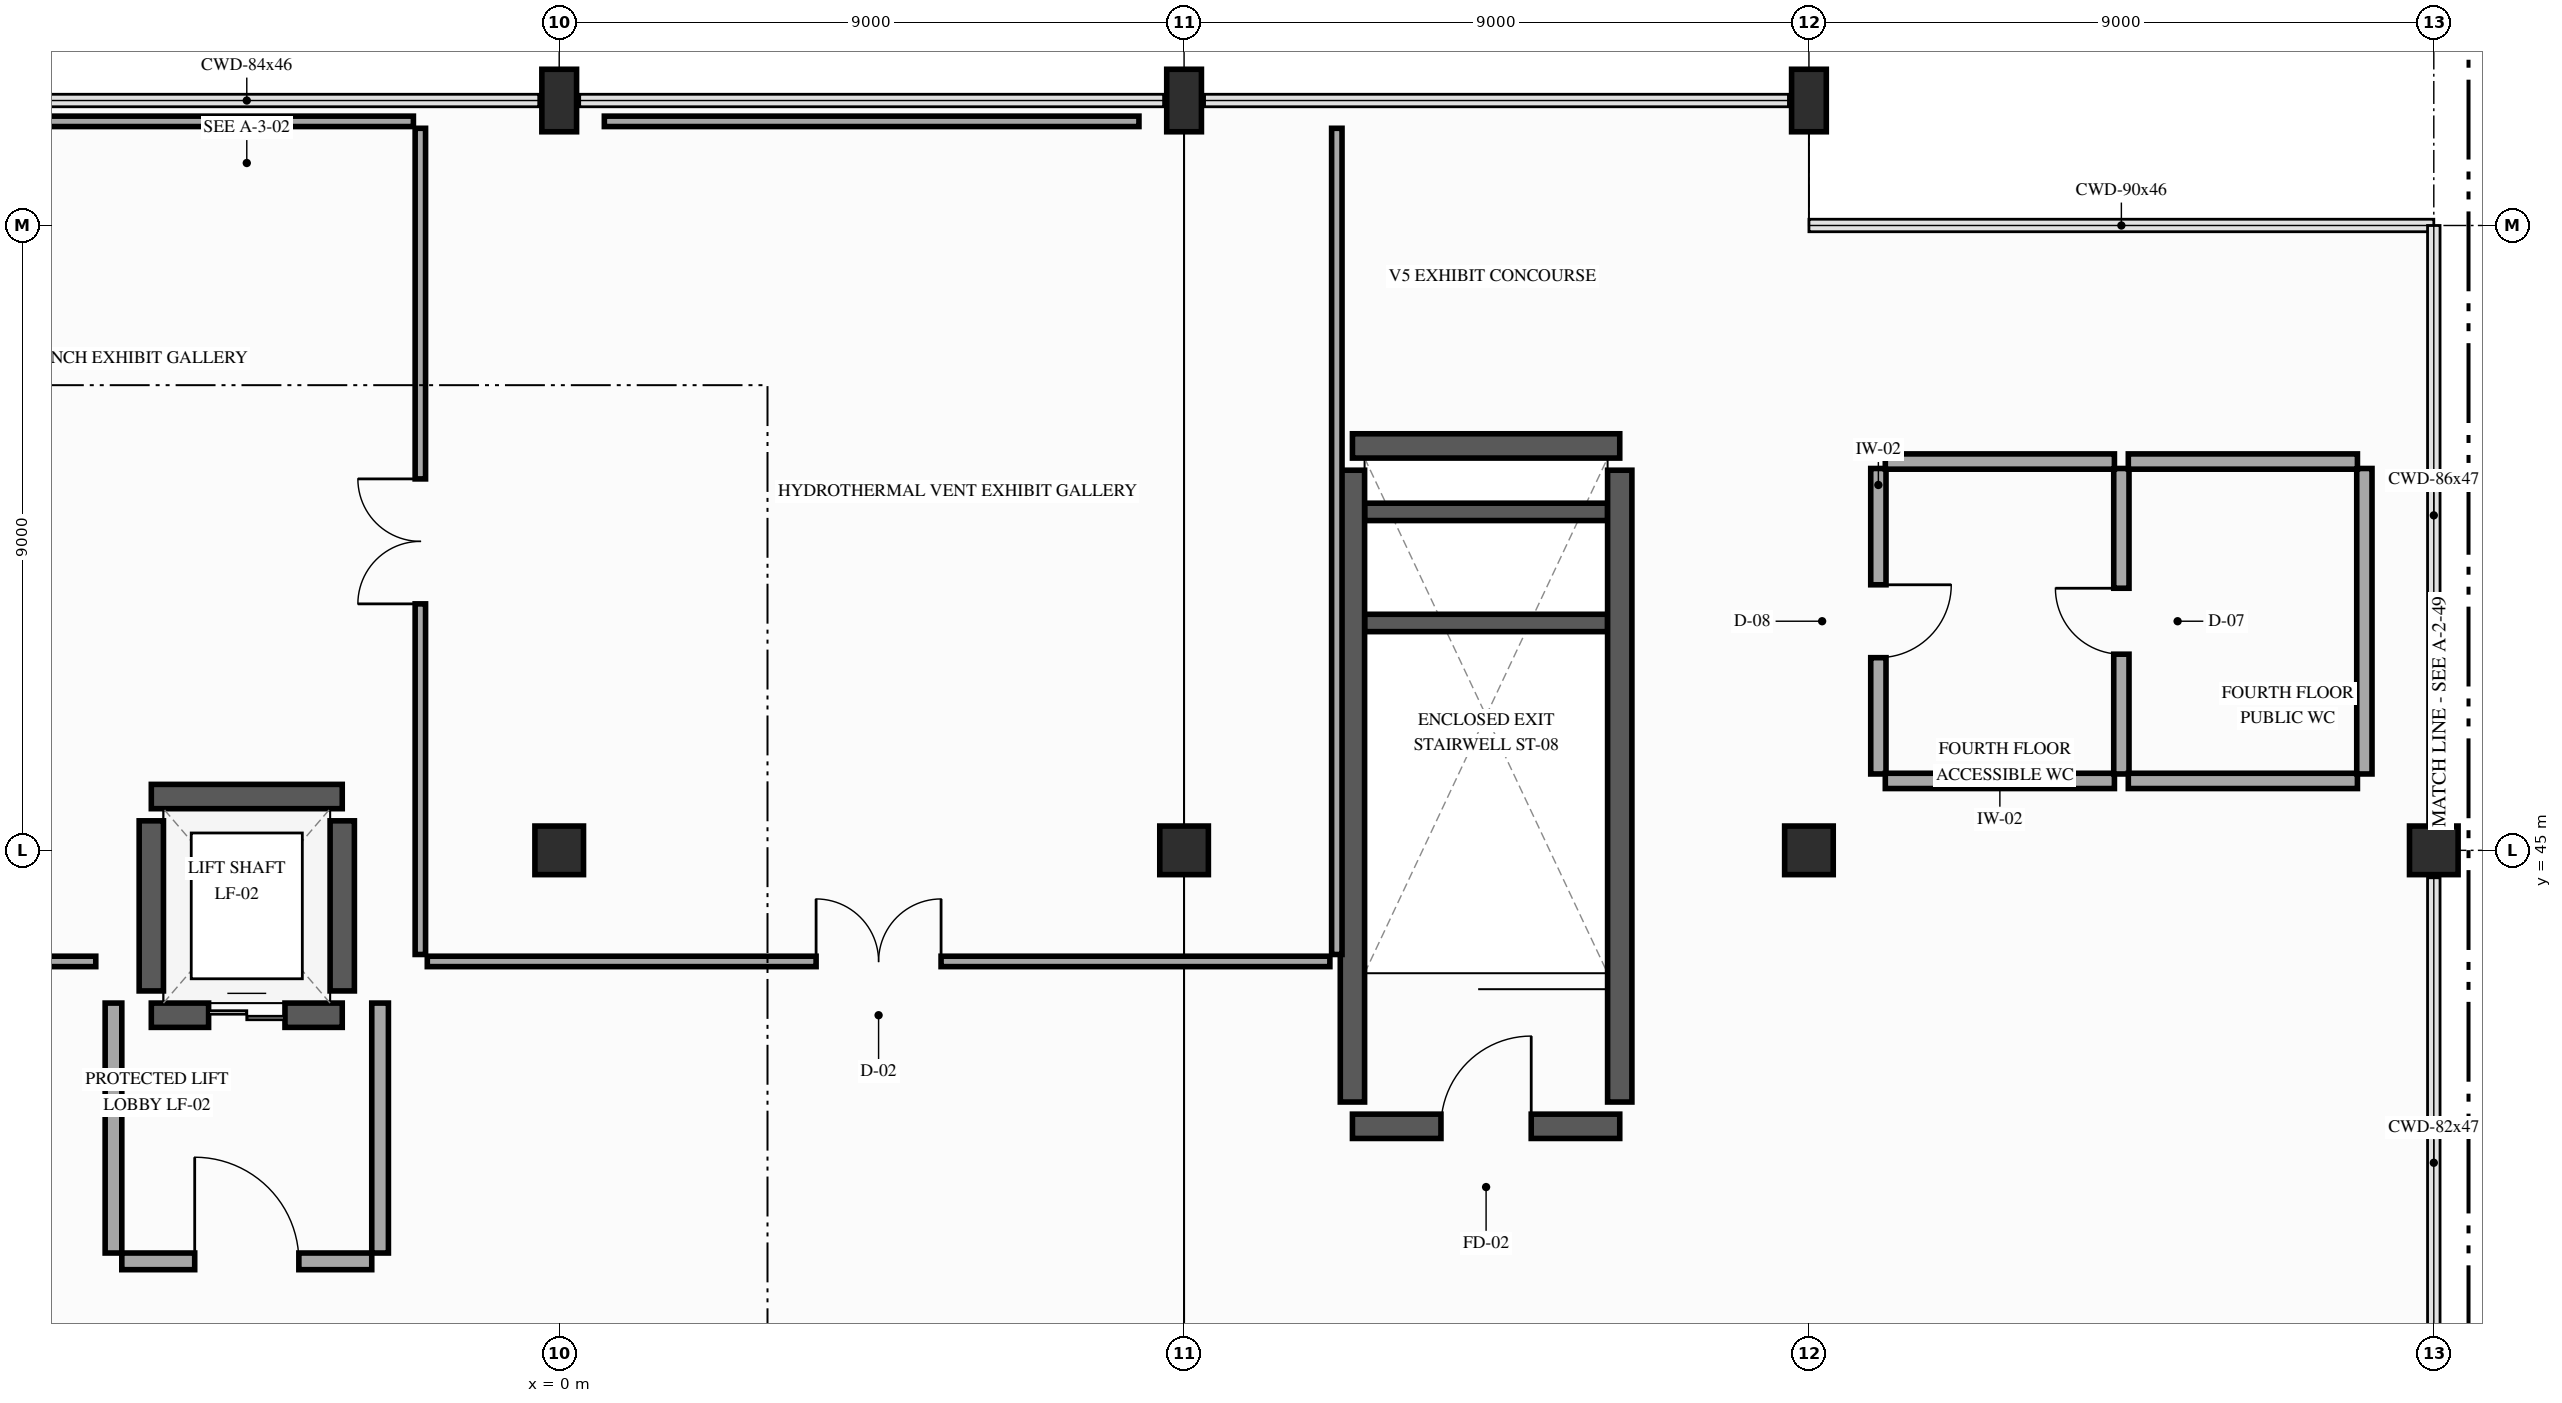
"""IFC4 building model, lengths in metres.
Left out: names, types, materials, properties, quantities, classifications, styles, units other than length and angle.
Written with IfcOpenShell. Run it as: python <this file> out.ifc"""

import sys

from ifc_helpers import new_model, si_unit, direction, frame, frame_2d, origin, origin_2d, place, context, subcontext, project, spatial, rectangle, extrude, element, fill, save


model = new_model("IFC4")
c1 = context("Model", 3, precision=1e-05, world=origin(), true_north=direction((0.0, 1.0)))
c2 = subcontext(c1, "Body", "Model", "MODEL_VIEW")
j1 = project(units=[si_unit("LENGTHUNIT", "METRE"), si_unit("PLANEANGLEUNIT", "RADIAN")], contexts=[c1])
p1 = place(None, origin())
s1 = spatial("IfcSite", under=j1, at=p1, CompositionType="ELEMENT")
p2 = place(p1, origin())
s2 = spatial("IfcBuilding", under=s1, at=p2, CompositionType="ELEMENT")
p3 = place(p2, frame((0.0, 0.0, 21.6)))
s3 = spatial("IfcBuildingStorey", under=s2, at=p3, CompositionType="ELEMENT", Elevation=21.6)
p4 = place(p3, frame((0.0, 45.0, 0.0), z_axis=(0.0, 0.0, 1.0), x_axis=(1.0, 0.0, 0.0)))
e1 = element("IfcColumn", 1, at=p4, inside=s3, PredefinedType="COLUMN", context=c2, shape_type="SweptSolid", body=[
    extrude(rectangle(XDim=0.7, YDim=0.7, at=origin_2d()), origin(), (0.0, 0.0, 1.0), 5.4),
])
p5 = place(p3, frame((0.0, 55.8, 0.0), z_axis=(0.0, 0.0, 1.0), x_axis=(1.0, 0.0, 0.0)))
e2 = element("IfcColumn", 2, at=p5, inside=s3, PredefinedType="PILASTER", context=c2, shape_type="SweptSolid", body=[
    extrude(rectangle(XDim=0.5, YDim=0.9, at=origin_2d()), origin(), (0.0, 0.0, 1.0), 5.4),
])
p6 = place(p3, frame((9.0, 45.0, 0.0), z_axis=(0.0, 0.0, 1.0), x_axis=(1.0, 0.0, 0.0)))
e3 = element("IfcColumn", 3, at=p6, inside=s3, PredefinedType="COLUMN", context=c2, shape_type="SweptSolid", body=[
    extrude(rectangle(XDim=0.7, YDim=0.7, at=origin_2d()), origin(), (0.0, 0.0, 1.0), 5.4),
])
p7 = place(p3, frame((9.0, 55.8, 0.0), z_axis=(0.0, 0.0, 1.0), x_axis=(1.0, 0.0, 0.0)))
e4 = element("IfcColumn", 4, at=p7, inside=s3, PredefinedType="PILASTER", context=c2, shape_type="SweptSolid", body=[
    extrude(rectangle(XDim=0.5, YDim=0.9, at=origin_2d()), origin(), (0.0, 0.0, 1.0), 5.4),
])
p8 = place(p3, frame((18.0, 45.0, 0.0), z_axis=(0.0, 0.0, 1.0), x_axis=(1.0, 0.0, 0.0)))
e5 = element("IfcColumn", 5, at=p8, inside=s3, PredefinedType="COLUMN", context=c2, shape_type="SweptSolid", body=[
    extrude(rectangle(XDim=0.7, YDim=0.7, at=origin_2d()), origin(), (0.0, 0.0, 1.0), 5.4),
])
p9 = place(p3, frame((18.0, 55.8, 0.0), z_axis=(0.0, 0.0, 1.0), x_axis=(1.0, 0.0, 0.0)))
e6 = element("IfcColumn", 6, at=p9, inside=s3, PredefinedType="PILASTER", context=c2, shape_type="SweptSolid", body=[
    extrude(rectangle(XDim=0.5, YDim=0.9, at=origin_2d()), origin(), (0.0, 0.0, 1.0), 5.4),
])
p10 = place(p3, frame((27.0, 45.0, 0.0), z_axis=(0.0, 0.0, 1.0), x_axis=(1.0, 0.0, 0.0)))
e7 = element("IfcColumn", 7, at=p10, inside=s3, PredefinedType="COLUMN", context=c2, shape_type="SweptSolid", body=[
    extrude(rectangle(XDim=0.7, YDim=0.7, at=origin_2d()), origin(), (0.0, 0.0, 1.0), 5.4),
])
for number, where, z_axis, x_axis in (
    (8, (11.6, 48.275, 0.0), (0.0, 0.0, 1.0), (1.0, 0.0, 0.0)),
    (9, (11.6, 49.875, 0.0), (0.0, 0.0, 1.0), (1.0, 0.0, 0.0)),
):
    element("IfcWall", number, at=place(p3, frame(where, z_axis=z_axis, x_axis=x_axis)), inside=s3, PredefinedType="SHEAR", context=c2, shape_type="SweptSolid", body=[
        extrude(rectangle(XDim=3.5, YDim=0.25, at=frame_2d((1.75, 0.0))), origin(), (0.0, 0.0, 1.0), 2.5),
    ])
p11 = place(p3, frame((11.425, 41.025, 0.0), z_axis=(0.0, 0.0, 1.0), x_axis=(1.0, 0.0, 0.0)))
e10 = element("IfcWall", 10, at=p11, inside=s3, PredefinedType="SHEAR", context=c2, shape_type="SweptSolid", body=[
    extrude(rectangle(XDim=3.85, YDim=0.35, at=frame_2d((1.925, 0.0))), origin(), (0.0, 0.0, 1.0), 5.15),
])
p12 = place(p11, frame((1.275, 0.0, 0.0)))
e11 = element("IfcOpeningElement", 11, at=p12, cuts=e10, PredefinedType="OPENING", context=c2, shape_type="SweptSolid", body=[
    extrude(rectangle(XDim=1.3, YDim=2.2, at=frame_2d((0.65, 1.1))), frame((0.0, 0.185, 0.0), z_axis=(0.0, -1.0, 0.0), x_axis=(1.0, 0.0, 0.0)), (0.0, 0.0, 1.0), 0.37),
])
p13 = place(p3, frame((11.425, 50.825, 0.0), z_axis=(0.0, 0.0, 1.0), x_axis=(1.0, 0.0, 0.0)))
e12 = element("IfcWall", 12, at=p13, inside=s3, PredefinedType="SHEAR", context=c2, shape_type="SweptSolid", body=[
    extrude(rectangle(XDim=3.85, YDim=0.35, at=frame_2d((1.925, 0.0))), origin(), (0.0, 0.0, 1.0), 5.15),
])
for number, where, z_axis, x_axis in (
    (13, (11.425, 41.375, 0.0), (0.0, 0.0, 1.0), (0.0, 1.0, 0.0)),
    (14, (15.275, 41.375, 0.0), (0.0, 0.0, 1.0), (0.0, 1.0, 0.0)),
):
    element("IfcWall", number, at=place(p3, frame(where, z_axis=z_axis, x_axis=x_axis)), inside=s3, PredefinedType="SHEAR", context=c2, shape_type="SweptSolid", body=[
        extrude(rectangle(XDim=9.1, YDim=0.35, at=frame_2d((4.55, 0.0))), origin(), (0.0, 0.0, 1.0), 5.15),
    ])
p14 = place(p3, frame((-5.875, 42.625, 0.0), z_axis=(0.0, 0.0, 1.0), x_axis=(1.0, 0.0, 0.0)))
e15 = element("IfcWall", 15, at=p14, inside=s3, PredefinedType="SHEAR", context=c2, shape_type="SweptSolid", body=[
    extrude(rectangle(XDim=2.75, YDim=0.35, at=frame_2d((1.375, 0.0))), origin(), (0.0, 0.0, 1.0), 5.15),
])
p15 = place(p14, frame((0.825, 0.0, 0.0)))
e16 = element("IfcOpeningElement", 16, at=p15, cuts=e15, PredefinedType="OPENING", context=c2, shape_type="SweptSolid", body=[
    extrude(rectangle(XDim=1.1, YDim=2.2, at=frame_2d((0.55, 1.1))), frame((0.0, 0.185, 0.0), z_axis=(0.0, -1.0, 0.0), x_axis=(1.0, 0.0, 0.0)), (0.0, 0.0, 1.0), 0.37),
])
p16 = place(p3, frame((-3.125, 45.775, 0.0), z_axis=(0.0, 0.0, 1.0), x_axis=(-1.0, 0.0, 0.0)))
e17 = element("IfcWall", 17, at=p16, inside=s3, PredefinedType="SHEAR", context=c2, shape_type="SweptSolid", body=[
    extrude(rectangle(XDim=2.75, YDim=0.35, at=frame_2d((1.375, 0.0))), origin(), (0.0, 0.0, 1.0), 5.15),
])
for number, where, z_axis, x_axis in (
    (18, (-5.875, 42.975, 0.0), (0.0, 0.0, 1.0), (0.0, 1.0, 0.0)),
    (19, (-3.125, 42.975, 0.0), (0.0, 0.0, 1.0), (0.0, 1.0, 0.0)),
):
    element("IfcWall", number, at=place(p3, frame(where, z_axis=z_axis, x_axis=x_axis)), inside=s3, PredefinedType="SHEAR", context=c2, shape_type="SweptSolid", body=[
        extrude(rectangle(XDim=2.45, YDim=0.35, at=frame_2d((1.225, 0.0))), origin(), (0.0, 0.0, 1.0), 5.15),
    ])
p17 = place(p3, frame((-6.3, 39.08, 0.0), z_axis=(0.0, 0.0, 1.0), x_axis=(1.0, 0.0, 0.0)))
e20 = element("IfcWall", 20, at=p17, inside=s3, PredefinedType="PARTITIONING", context=c2, shape_type="SweptSolid", body=[
    extrude(rectangle(XDim=3.6, YDim=0.24, at=frame_2d((1.8, 0.0))), origin(), (0.0, 0.0, 1.0), 5.1),
])
p18 = place(p17, frame((1.05, 0.0, 0.0)))
e21 = element("IfcOpeningElement", 21, at=p18, cuts=e20, PredefinedType="OPENING", context=c2, shape_type="SweptSolid", body=[
    extrude(rectangle(XDim=1.5, YDim=2.2, at=frame_2d((0.75, 1.1))), frame((0.0, 0.13, 0.0), z_axis=(0.0, -1.0, 0.0), x_axis=(1.0, 0.0, 0.0)), (0.0, 0.0, 1.0), 0.26),
])
for number, where, z_axis, x_axis in (
    (22, (-6.42, 39.2, 0.0), (0.0, 0.0, 1.0), (0.0, 1.0, 0.0)),
    (23, (-2.58, 39.2, 0.0), (0.0, 0.0, 1.0), (0.0, 1.0, 0.0)),
):
    element("IfcWall", number, at=place(p3, frame(where, z_axis=z_axis, x_axis=x_axis)), inside=s3, PredefinedType="PARTITIONING", context=c2, shape_type="SweptSolid", body=[
        extrude(rectangle(XDim=3.6, YDim=0.24, at=frame_2d((1.8, 0.0))), origin(), (0.0, 0.0, 1.0), 5.1),
    ])
p19 = place(p3, frame((19.0, 50.5, 0.0), z_axis=(0.0, 0.0, 1.0), x_axis=(0.0, -1.0, 0.0)))
e24 = element("IfcWall", 24, at=p19, inside=s3, PredefinedType="PLUMBINGWALL", context=c2, shape_type="SweptSolid", body=[
    extrude(rectangle(XDim=4.4, YDim=0.22, at=frame_2d((2.2, 0.0))), origin(), (0.0, 0.0, 1.0), 5.05),
])
p20 = place(p19, frame((1.675, 0.0, 0.0)))
e25 = element("IfcOpeningElement", 25, at=p20, cuts=e24, PredefinedType="OPENING", context=c2, shape_type="SweptSolid", body=[
    extrude(rectangle(XDim=1.05, YDim=2.15, at=frame_2d((0.525, 1.075))), frame((0.0, 0.12, 0.0), z_axis=(0.0, -1.0, 0.0), x_axis=(1.0, 0.0, 0.0)), (0.0, 0.0, 1.0), 0.24),
])
p21 = place(p3, frame((19.1, 46.0, 0.0), z_axis=(0.0, 0.0, 1.0), x_axis=(1.0, 0.0, 0.0)))
e26 = element("IfcWall", 26, at=p21, inside=s3, PredefinedType="PLUMBINGWALL", context=c2, shape_type="SweptSolid", body=[
    extrude(rectangle(XDim=3.3, YDim=0.22, at=frame_2d((1.65, 0.0))), origin(), (0.0, 0.0, 1.0), 5.05),
])
p22 = place(p3, frame((22.5, 46.1, 0.0), z_axis=(0.0, 0.0, 1.0), x_axis=(0.0, 1.0, 0.0)))
e27 = element("IfcWall", 27, at=p22, inside=s3, PredefinedType="PLUMBINGWALL", context=c2, shape_type="SweptSolid", body=[
    extrude(rectangle(XDim=4.4, YDim=0.22, at=frame_2d((2.2, 0.0))), origin(), (0.0, 0.0, 1.0), 5.05),
])
p23 = place(p22, frame((1.725, 0.0, 0.0)))
e28 = element("IfcOpeningElement", 28, at=p23, cuts=e27, PredefinedType="OPENING", context=c2, shape_type="SweptSolid", body=[
    extrude(rectangle(XDim=0.95, YDim=2.15, at=frame_2d((0.475, 1.075))), frame((0.0, 0.12, 0.0), z_axis=(0.0, -1.0, 0.0), x_axis=(1.0, 0.0, 0.0)), (0.0, 0.0, 1.0), 0.24),
])
for number, where, z_axis, x_axis in (
    (29, (22.4, 50.6, 0.0), (0.0, 0.0, 1.0), (-1.0, 0.0, 0.0)),
    (30, (22.6, 46.0, 0.0), (0.0, 0.0, 1.0), (1.0, 0.0, 0.0)),
):
    element("IfcWall", number, at=place(p3, frame(where, z_axis=z_axis, x_axis=x_axis)), inside=s3, PredefinedType="PLUMBINGWALL", context=c2, shape_type="SweptSolid", body=[
        extrude(rectangle(XDim=3.3, YDim=0.22, at=frame_2d((1.65, 0.0))), origin(), (0.0, 0.0, 1.0), 5.05),
    ])
p24 = place(p3, frame((26.0, 46.1, 0.0), z_axis=(0.0, 0.0, 1.0), x_axis=(0.0, 1.0, 0.0)))
e31 = element("IfcWall", 31, at=p24, inside=s3, PredefinedType="PLUMBINGWALL", context=c2, shape_type="SweptSolid", body=[
    extrude(rectangle(XDim=4.4, YDim=0.22, at=frame_2d((2.2, 0.0))), origin(), (0.0, 0.0, 1.0), 5.05),
])
p25 = place(p3, frame((25.9, 50.6, 0.0), z_axis=(0.0, 0.0, 1.0), x_axis=(-1.0, 0.0, 0.0)))
e32 = element("IfcWall", 32, at=p25, inside=s3, PredefinedType="PLUMBINGWALL", context=c2, shape_type="SweptSolid", body=[
    extrude(rectangle(XDim=3.3, YDim=0.22, at=frame_2d((1.65, 0.0))), origin(), (0.0, 0.0, 1.0), 5.05),
])
p26 = place(p3, frame((-8.826, 43.4, 0.0), z_axis=(0.0, 0.0, 1.0), x_axis=(1.0, 0.0, 0.0)))
e33 = element("IfcWall", 33, at=p26, inside=s3, PredefinedType="PARTITIONING", context=c2, shape_type="SweptSolid", body=[
    extrude(rectangle(XDim=2.151, YDim=0.15, at=frame_2d((1.075, 0.0))), origin(), (0.0, 0.0, 1.0), 4.685),
])
p27 = place(p3, frame((-2.0, 43.5, 0.0), z_axis=(0.0, 0.0, 1.0), x_axis=(0.0, 1.0, 0.0)))
e34 = element("IfcWall", 34, at=p27, inside=s3, PredefinedType="PARTITIONING", context=c2, shape_type="SweptSolid", body=[
    extrude(rectangle(XDim=11.9, YDim=0.15, at=frame_2d((5.95, 0.0))), origin(), (0.0, 0.0, 1.0), 4.635),
])
p28 = place(p27, frame((5.05, 0.0, 0.0)))
e35 = element("IfcOpeningElement", 35, at=p28, cuts=e34, PredefinedType="OPENING", context=c2, shape_type="SweptSolid", body=[
    extrude(rectangle(XDim=1.8, YDim=2.3, at=frame_2d((0.9, 1.15))), frame((0.0, 0.085, 0.0), z_axis=(0.0, -1.0, 0.0), x_axis=(1.0, 0.0, 0.0)), (0.0, 0.0, 1.0), 0.17),
])
p29 = place(p3, frame((-2.1, 55.5, 0.0), z_axis=(0.0, 0.0, 1.0), x_axis=(-1.0, 0.0, 0.0)))
e36 = element("IfcWall", 36, at=p29, inside=s3, PredefinedType="PARTITIONING", context=c2, shape_type="SweptSolid", body=[
    extrude(rectangle(XDim=6.25, YDim=0.15, at=frame_2d((3.125, 0.0))), origin(), (0.0, 0.0, 1.0), 4.635),
])
p30 = place(p3, frame((-1.9, 43.4, 0.0), z_axis=(0.0, 0.0, 1.0), x_axis=(1.0, 0.0, 0.0)))
e37 = element("IfcWall", 37, at=p30, inside=s3, PredefinedType="PARTITIONING", context=c2, shape_type="SweptSolid", body=[
    extrude(rectangle(XDim=13.0, YDim=0.15, at=frame_2d((6.5, 0.0))), origin(), (0.0, 0.0, 1.0), 4.685),
])
p31 = place(p30, frame((5.6, 0.0, 0.0)))
e38 = element("IfcOpeningElement", 38, at=p31, cuts=e37, PredefinedType="OPENING", context=c2, shape_type="SweptSolid", body=[
    extrude(rectangle(XDim=1.8, YDim=2.3, at=frame_2d((0.9, 1.15))), frame((0.0, 0.085, 0.0), z_axis=(0.0, -1.0, 0.0), x_axis=(1.0, 0.0, 0.0)), (0.0, 0.0, 1.0), 0.17),
])
p32 = place(p3, frame((11.2, 43.5, 0.0), z_axis=(0.0, 0.0, 1.0), x_axis=(0.0, 1.0, 0.0)))
e39 = element("IfcWall", 39, at=p32, inside=s3, PredefinedType="PARTITIONING", context=c2, shape_type="SweptSolid", body=[
    extrude(rectangle(XDim=11.9, YDim=0.15, at=frame_2d((5.95, 0.0))), origin(), (0.0, 0.0, 1.0), 4.635),
])
p33 = place(p3, frame((8.35, 55.5, 0.0), z_axis=(0.0, 0.0, 1.0), x_axis=(-1.0, 0.0, 0.0)))
e40 = element("IfcWall", 40, at=p33, inside=s3, PredefinedType="PARTITIONING", context=c2, shape_type="SweptSolid", body=[
    extrude(rectangle(XDim=7.7, YDim=0.15, at=frame_2d((3.85, 0.0))), origin(), (0.0, 0.0, 1.0), 4.635),
])
p34 = place(p12, origin())
e41 = element("IfcDoor", 41, at=p34, inside=s3, OperationType="SINGLE_SWING_RIGHT", PredefinedType="DOOR", context=c2, shape_type="SweptSolid", body=[
    extrude(rectangle(XDim=1.3, YDim=2.2, at=frame_2d((0.65, 1.1))), frame((0.0, 0.025, 0.0), z_axis=(0.0, -1.0, 0.0), x_axis=(1.0, 0.0, 0.0)), (0.0, 0.0, 1.0), 0.05),
])
fill(e11, e41)
p35 = place(p15, origin())
e42 = element("IfcDoor", 42, at=p35, inside=s3, OperationType="DOUBLE_DOOR_SLIDING", PredefinedType="DOOR", context=c2, shape_type="SweptSolid", body=[
    extrude(rectangle(XDim=1.1, YDim=2.2, at=frame_2d((0.55, 1.1))), frame((0.0, 0.025, 0.0), z_axis=(0.0, -1.0, 0.0), x_axis=(1.0, 0.0, 0.0)), (0.0, 0.0, 1.0), 0.05),
])
fill(e16, e42)
p36 = place(p18, origin())
e43 = element("IfcDoor", 43, at=p36, inside=s3, OperationType="SINGLE_SWING_LEFT", PredefinedType="DOOR", context=c2, shape_type="SweptSolid", body=[
    extrude(rectangle(XDim=1.5, YDim=2.2, at=frame_2d((0.75, 1.1))), frame((0.0, 0.025, 0.0), z_axis=(0.0, -1.0, 0.0), x_axis=(1.0, 0.0, 0.0)), (0.0, 0.0, 1.0), 0.05),
])
fill(e21, e43)
p37 = place(p20, origin())
e44 = element("IfcDoor", 44, at=p37, inside=s3, OperationType="SINGLE_SWING_LEFT", PredefinedType="DOOR", context=c2, shape_type="SweptSolid", body=[
    extrude(rectangle(XDim=1.05, YDim=2.15, at=frame_2d((0.525, 1.075))), frame((0.0, 0.025, 0.0), z_axis=(0.0, -1.0, 0.0), x_axis=(1.0, 0.0, 0.0)), (0.0, 0.0, 1.0), 0.05),
])
fill(e25, e44)
p38 = place(p23, origin())
e45 = element("IfcDoor", 45, at=p38, inside=s3, OperationType="SINGLE_SWING_RIGHT", PredefinedType="DOOR", context=c2, shape_type="SweptSolid", body=[
    extrude(rectangle(XDim=0.95, YDim=2.15, at=frame_2d((0.475, 1.075))), frame((0.0, 0.025, 0.0), z_axis=(0.0, -1.0, 0.0), x_axis=(1.0, 0.0, 0.0)), (0.0, 0.0, 1.0), 0.05),
])
fill(e28, e45)
p39 = place(p28, origin())
e46 = element("IfcDoor", 46, at=p39, inside=s3, OperationType="DOUBLE_DOOR_SINGLE_SWING", PredefinedType="DOOR", context=c2, shape_type="SweptSolid", body=[
    extrude(rectangle(XDim=1.8, YDim=2.3, at=frame_2d((0.9, 1.15))), frame((0.0, 0.025, 0.0), z_axis=(0.0, -1.0, 0.0), x_axis=(1.0, 0.0, 0.0)), (0.0, 0.0, 1.0), 0.05),
])
fill(e35, e46)
p40 = place(p31, origin())
e47 = element("IfcDoor", 47, at=p40, inside=s3, OperationType="DOUBLE_DOOR_SINGLE_SWING", PredefinedType="DOOR", context=c2, shape_type="SweptSolid", body=[
    extrude(rectangle(XDim=1.8, YDim=2.3, at=frame_2d((0.9, 1.15))), frame((0.0, 0.025, 0.0), z_axis=(0.0, -1.0, 0.0), x_axis=(1.0, 0.0, 0.0)), (0.0, 0.0, 1.0), 0.05),
])
fill(e38, e47)
save(model, sys.argv[1])
